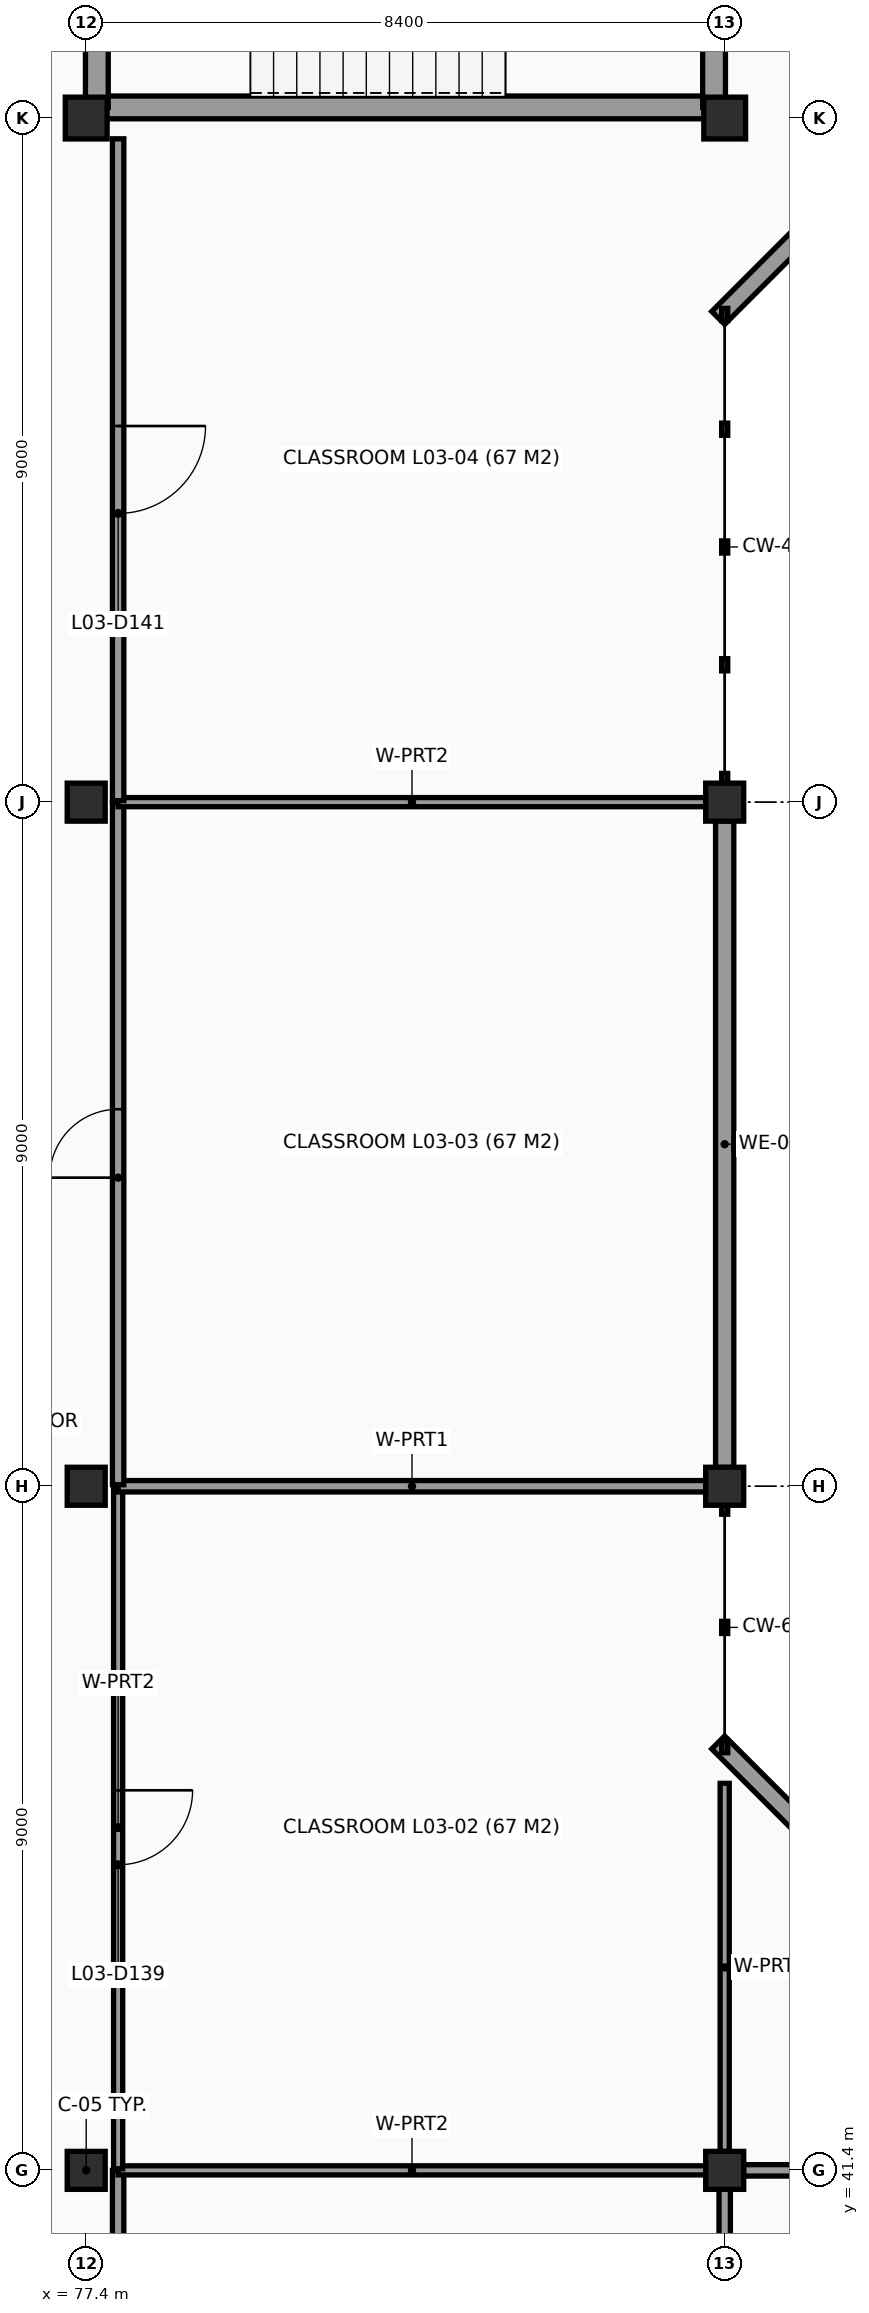
"""IFC4 building model, lengths in metres.
Left out: names, types, materials, properties, quantities, classifications, styles, units other than length and angle.
Written with IfcOpenShell. Run it as: python <this file> out.ifc"""

import sys

from ifc_helpers import new_model, si_unit, direction, frame, frame_2d, origin, origin_2d, place, context, subcontext, project, spatial, rectangle, extrude, element, fill, save


model = new_model("IFC4")
c1 = context("Model", 3, precision=1e-05, world=origin(), true_north=direction((0.0, 1.0)))
c2 = subcontext(c1, "Body", "Model", "MODEL_VIEW")
j1 = project(units=[si_unit("LENGTHUNIT", "METRE"), si_unit("PLANEANGLEUNIT", "RADIAN")], contexts=[c1])
p1 = place(None, origin())
s1 = spatial("IfcSite", under=j1, at=p1, CompositionType="ELEMENT")
p2 = place(p1, origin())
s2 = spatial("IfcBuilding", under=s1, at=p2, CompositionType="ELEMENT")
p3 = place(p2, frame((0.0, 0.0, 11.4)))
s3 = spatial("IfcBuildingStorey", under=s2, at=p3, CompositionType="ELEMENT", Elevation=11.4)
for number, where, z_axis, x_axis in (
    (1, (77.4, 41.4, 0.0), (0.0, 0.0, 1.0), (1.0, 0.0, 0.0)),
    (2, (77.4, 50.4, 0.0), (0.0, 0.0, 1.0), (1.0, 0.0, 0.0)),
    (3, (77.4, 59.4, 0.0), (0.0, 0.0, 1.0), (1.0, 0.0, 0.0)),
):
    element("IfcColumn", number, at=place(p3, frame(where, z_axis=z_axis, x_axis=x_axis)), inside=s3, PredefinedType="COLUMN", context=c2, shape_type="SweptSolid", body=[
        extrude(rectangle(XDim=0.5, YDim=0.5, at=origin_2d()), origin(), (0.0, 0.0, 1.0), 3.34),
    ])
p4 = place(p3, frame((77.4, 68.4, 0.0), z_axis=(0.0, 0.0, 1.0), x_axis=(1.0, 0.0, 0.0)))
e4 = element("IfcColumn", 4, at=p4, inside=s3, PredefinedType="COLUMN", context=c2, shape_type="SweptSolid", body=[
    extrude(rectangle(XDim=0.55, YDim=0.55, at=origin_2d()), origin(), (0.0, 0.0, 1.0), 3.6),
])
for number, where, z_axis, x_axis in (
    (5, (85.8, 41.4, 0.0), (0.0, 0.0, 1.0), (1.0, 0.0, 0.0)),
    (6, (85.8, 50.4, 0.0), (0.0, 0.0, 1.0), (1.0, 0.0, 0.0)),
    (7, (85.8, 59.4, 0.0), (0.0, 0.0, 1.0), (1.0, 0.0, 0.0)),
):
    element("IfcColumn", number, at=place(p3, frame(where, z_axis=z_axis, x_axis=x_axis)), inside=s3, PredefinedType="COLUMN", context=c2, shape_type="SweptSolid", body=[
        extrude(rectangle(XDim=0.5, YDim=0.5, at=origin_2d()), origin(), (0.0, 0.0, 1.0), 3.34),
    ])
p5 = place(p3, frame((85.8, 68.4, 0.0), z_axis=(0.0, 0.0, 1.0), x_axis=(1.0, 0.0, 0.0)))
e8 = element("IfcColumn", 8, at=p5, inside=s3, PredefinedType="COLUMN", context=c2, shape_type="SweptSolid", body=[
    extrude(rectangle(XDim=0.55, YDim=0.55, at=origin_2d()), origin(), (0.0, 0.0, 1.0), 3.6),
])
p6 = place(p3, frame((85.8, 59.152, 0.0), z_axis=(0.0, 0.0, 1.0), x_axis=(0.0, -1.0, 0.0)))
e9 = element("IfcWall", 9, at=p6, inside=s3, PredefinedType="SOLIDWALL", context=c2, shape_type="SweptSolid", body=[
    extrude(rectangle(XDim=8.504, YDim=0.24, at=frame_2d((4.252, 0.0))), origin(), (0.0, 0.0, 1.0), 2.58),
])
p7 = place(p3, frame((85.715, 47.029, 0.0), z_axis=(0.0, 0.0, 1.0), x_axis=(0.707121887885, -0.707091674165, 0.0)))
e10 = element("IfcWall", 10, at=p7, inside=s3, PredefinedType="SOLIDWALL", context=c2, shape_type="SweptSolid", body=[
    extrude(rectangle(XDim=8.081, YDim=0.24, at=frame_2d((4.04, 0.0))), origin(), (0.0, 0.0, 1.0), 2.53),
])
p8 = place(p3, frame((91.429, 71.485, 0.0), z_axis=(0.0, 0.0, 1.0), x_axis=(-0.707106781187, -0.707106781187, 0.0)))
e11 = element("IfcWall", 11, at=p8, inside=s3, PredefinedType="SOLIDWALL", context=c2, shape_type="SweptSolid", body=[
    extrude(rectangle(XDim=8.081, YDim=0.24, at=frame_2d((4.04, 0.0))), origin(), (0.0, 0.0, 1.0), 2.58),
])
p9 = place(p3, frame((77.54, 68.54, 0.0), z_axis=(0.0, 0.0, 1.0), x_axis=(1.0, 0.0, 0.0)))
e12 = element("IfcWall", 12, at=p9, inside=s3, PredefinedType="SHEAR", context=c2, shape_type="SweptSolid", body=[
    extrude(rectangle(XDim=8.12, YDim=0.3, at=frame_2d((4.06, 0.0))), origin(), (0.0, 0.0, 1.0), 3.6),
])
for number, where, z_axis, x_axis in (
    (13, (85.66, 68.54, 0.0), (0.0, 0.0, 1.0), (0.0, 1.0, 0.0)),
    (14, (77.54, 72.74, 0.0), (0.0, 0.0, 1.0), (0.0, -1.0, 0.0)),
):
    element("IfcWall", number, at=place(p3, frame(where, z_axis=z_axis, x_axis=x_axis)), inside=s3, PredefinedType="SHEAR", context=c2, shape_type="SweptSolid", body=[
        extrude(rectangle(XDim=4.2, YDim=0.3, at=frame_2d((2.1, 0.0))), origin(), (0.0, 0.0, 1.0), 3.6),
    ])
p10 = place(p3, frame((77.82, 32.723, 0.0), z_axis=(0.0, 0.0, 1.0), x_axis=(0.0, 1.0, 0.0)))
e15 = element("IfcWall", 15, at=p10, inside=s3, PredefinedType="PARTITIONING", context=c2, shape_type="SweptSolid", body=[
    extrude(rectangle(XDim=8.677, YDim=0.15, at=frame_2d((4.338, 0.0))), origin(), (0.0, 0.0, 1.0), 2.53),
])
p11 = place(p10, frame((3.388, 0.0, 0.0)))
e16 = element("IfcOpeningElement", 16, at=p11, cuts=e15, PredefinedType="OPENING", context=c2, shape_type="SweptSolid", body=[
    extrude(rectangle(XDim=1.9, YDim=2.3, at=frame_2d((0.95, 1.15))), frame((0.0, 0.085, 0.0), z_axis=(0.0, -1.0, 0.0), x_axis=(1.0, 0.0, 0.0)), (0.0, 0.0, 1.0), 0.17),
])
p12 = place(p3, frame((77.82, 41.4, 0.0), z_axis=(0.0, 0.0, 1.0), x_axis=(1.0, 0.0, 0.0)))
e17 = element("IfcWall", 17, at=p12, inside=s3, PredefinedType="PARTITIONING", context=c2, shape_type="SweptSolid", body=[
    extrude(rectangle(XDim=7.732, YDim=0.12, at=frame_2d((3.866, 0.0))), origin(), (0.0, 0.0, 1.0), 2.53),
])
p13 = place(p3, frame((85.8, 41.152, 0.0), z_axis=(0.0, 0.0, 1.0), x_axis=(0.0, -1.0, 0.0)))
e18 = element("IfcWall", 18, at=p13, inside=s3, PredefinedType="PARTITIONING", context=c2, shape_type="SweptSolid", body=[
    extrude(rectangle(XDim=8.429, YDim=0.15, at=frame_2d((4.215, 0.0))), origin(), (0.0, 0.0, 1.0), 2.63),
])
p14 = place(p3, frame((77.82, 41.42, 0.0), z_axis=(0.0, 0.0, 1.0), x_axis=(0.0, 1.0, 0.0)))
e19 = element("IfcWall", 19, at=p14, inside=s3, PredefinedType="PARTITIONING", context=c2, shape_type="SweptSolid", body=[
    extrude(rectangle(XDim=8.98, YDim=0.12, at=frame_2d((4.49, 0.0))), origin(), (0.0, 0.0, 1.0), 2.53),
])
p15 = place(p14, frame((4.0, 0.0, 0.0)))
e20 = element("IfcOpeningElement", 20, at=p15, cuts=e19, PredefinedType="OPENING", context=c2, shape_type="SweptSolid", body=[
    extrude(rectangle(XDim=0.98, YDim=2.12, at=frame_2d((0.49, 1.06))), frame((0.0, 0.07, 0.0), z_axis=(0.0, -1.0, 0.0), x_axis=(1.0, 0.0, 0.0)), (0.0, 0.0, 1.0), 0.14),
])
p16 = place(p3, frame((77.82, 50.4, 0.0), z_axis=(0.0, 0.0, 1.0), x_axis=(1.0, 0.0, 0.0)))
e21 = element("IfcWall", 21, at=p16, inside=s3, PredefinedType="PARTITIONING", context=c2, shape_type="SweptSolid", body=[
    extrude(rectangle(XDim=7.732, YDim=0.15, at=frame_2d((3.866, 0.0))), origin(), (0.0, 0.0, 1.0), 2.63),
])
p17 = place(p3, frame((85.8, 46.491, 0.0), z_axis=(0.0, 0.0, 1.0), x_axis=(0.0, -1.0, 0.0)))
e22 = element("IfcWall", 22, at=p17, inside=s3, PredefinedType="PARTITIONING", context=c2, shape_type="SweptSolid", body=[
    extrude(rectangle(XDim=4.844, YDim=0.12, at=frame_2d((2.422, 0.0))), origin(), (0.0, 0.0, 1.0), 2.63),
])
p18 = place(p3, frame((77.82, 50.42, 0.0), z_axis=(0.0, 0.0, 1.0), x_axis=(0.0, 1.0, 0.0)))
e23 = element("IfcWall", 23, at=p18, inside=s3, PredefinedType="PARTITIONING", context=c2, shape_type="SweptSolid", body=[
    extrude(rectangle(XDim=8.98, YDim=0.15, at=frame_2d((4.49, 0.0))), origin(), (0.0, 0.0, 1.0), 2.48),
])
p19 = place(p18, frame((4.04, 0.0, 0.0)))
e24 = element("IfcOpeningElement", 24, at=p19, cuts=e23, PredefinedType="OPENING", context=c2, shape_type="SweptSolid", body=[
    extrude(rectangle(XDim=0.9, YDim=2.05, at=frame_2d((0.45, 1.025))), frame((0.0, 0.085, 0.0), z_axis=(0.0, -1.0, 0.0), x_axis=(1.0, 0.0, 0.0)), (0.0, 0.0, 1.0), 0.17),
])
p20 = place(p3, frame((77.82, 59.4, 0.0), z_axis=(0.0, 0.0, 1.0), x_axis=(1.0, 0.0, 0.0)))
e25 = element("IfcWall", 25, at=p20, inside=s3, PredefinedType="PARTITIONING", context=c2, shape_type="SweptSolid", body=[
    extrude(rectangle(XDim=7.732, YDim=0.12, at=frame_2d((3.866, 0.0))), origin(), (0.0, 0.0, 1.0), 2.48),
])
p21 = place(p3, frame((77.82, 59.42, 0.0), z_axis=(0.0, 0.0, 1.0), x_axis=(0.0, 1.0, 0.0)))
e26 = element("IfcWall", 26, at=p21, inside=s3, PredefinedType="PARTITIONING", context=c2, shape_type="SweptSolid", body=[
    extrude(rectangle(XDim=8.707, YDim=0.15, at=frame_2d((4.354, 0.0))), origin(), (0.0, 0.0, 1.0), 2.48),
])
p22 = place(p21, frame((3.779, 0.0, 0.0)))
e27 = element("IfcOpeningElement", 27, at=p22, cuts=e26, PredefinedType="OPENING", context=c2, shape_type="SweptSolid", body=[
    extrude(rectangle(XDim=1.15, YDim=2.15, at=frame_2d((0.575, 1.075))), frame((0.0, 0.085, 0.0), z_axis=(0.0, -1.0, 0.0), x_axis=(1.0, 0.0, 0.0)), (0.0, 0.0, 1.0), 0.17),
])
p23 = place(p3, frame((86.048, 41.4, 0.0), z_axis=(0.0, 0.0, 1.0), x_axis=(1.0, 0.0, 0.0)))
e28 = element("IfcWall", 28, at=p23, inside=s3, PredefinedType="PARTITIONING", context=c2, shape_type="SweptSolid", body=[
    extrude(rectangle(XDim=4.844, YDim=0.15, at=frame_2d((2.422, 0.0))), origin(), (0.0, 0.0, 1.0), 2.53),
])
p24 = place(p23, frame((1.897, 0.0, 0.0)))
e29 = element("IfcOpeningElement", 29, at=p24, cuts=e28, PredefinedType="OPENING", context=c2, shape_type="SweptSolid", body=[
    extrude(rectangle(XDim=1.05, YDim=2.15, at=frame_2d((0.525, 1.075))), frame((0.0, 0.085, 0.0), z_axis=(0.0, -1.0, 0.0), x_axis=(1.0, 0.0, 0.0)), (0.0, 0.0, 1.0), 0.17),
])
p25 = place(p15, origin())
e30 = element("IfcDoor", 30, at=p25, inside=s3, OperationType="SINGLE_SWING_RIGHT", PredefinedType="DOOR", context=c2, shape_type="SweptSolid", body=[
    extrude(rectangle(XDim=0.98, YDim=2.12, at=frame_2d((0.49, 1.06))), frame((0.0, 0.025, 0.0), z_axis=(0.0, -1.0, 0.0), x_axis=(1.0, 0.0, 0.0)), (0.0, 0.0, 1.0), 0.05),
])
fill(e20, e30)
p26 = place(p19, origin())
e31 = element("IfcDoor", 31, at=p26, inside=s3, OperationType="SINGLE_SWING_LEFT", PredefinedType="DOOR", context=c2, shape_type="SweptSolid", body=[
    extrude(rectangle(XDim=0.9, YDim=2.05, at=frame_2d((0.45, 1.025))), frame((0.0, 0.025, 0.0), z_axis=(0.0, -1.0, 0.0), x_axis=(1.0, 0.0, 0.0)), (0.0, 0.0, 1.0), 0.05),
])
fill(e24, e31)
p27 = place(p22, origin())
e32 = element("IfcDoor", 32, at=p27, inside=s3, OperationType="SINGLE_SWING_RIGHT", PredefinedType="DOOR", context=c2, shape_type="SweptSolid", body=[
    extrude(rectangle(XDim=1.15, YDim=2.15, at=frame_2d((0.575, 1.075))), frame((0.0, 0.025, 0.0), z_axis=(0.0, -1.0, 0.0), x_axis=(1.0, 0.0, 0.0)), (0.0, 0.0, 1.0), 0.05),
])
fill(e27, e32)
save(model, sys.argv[1])
